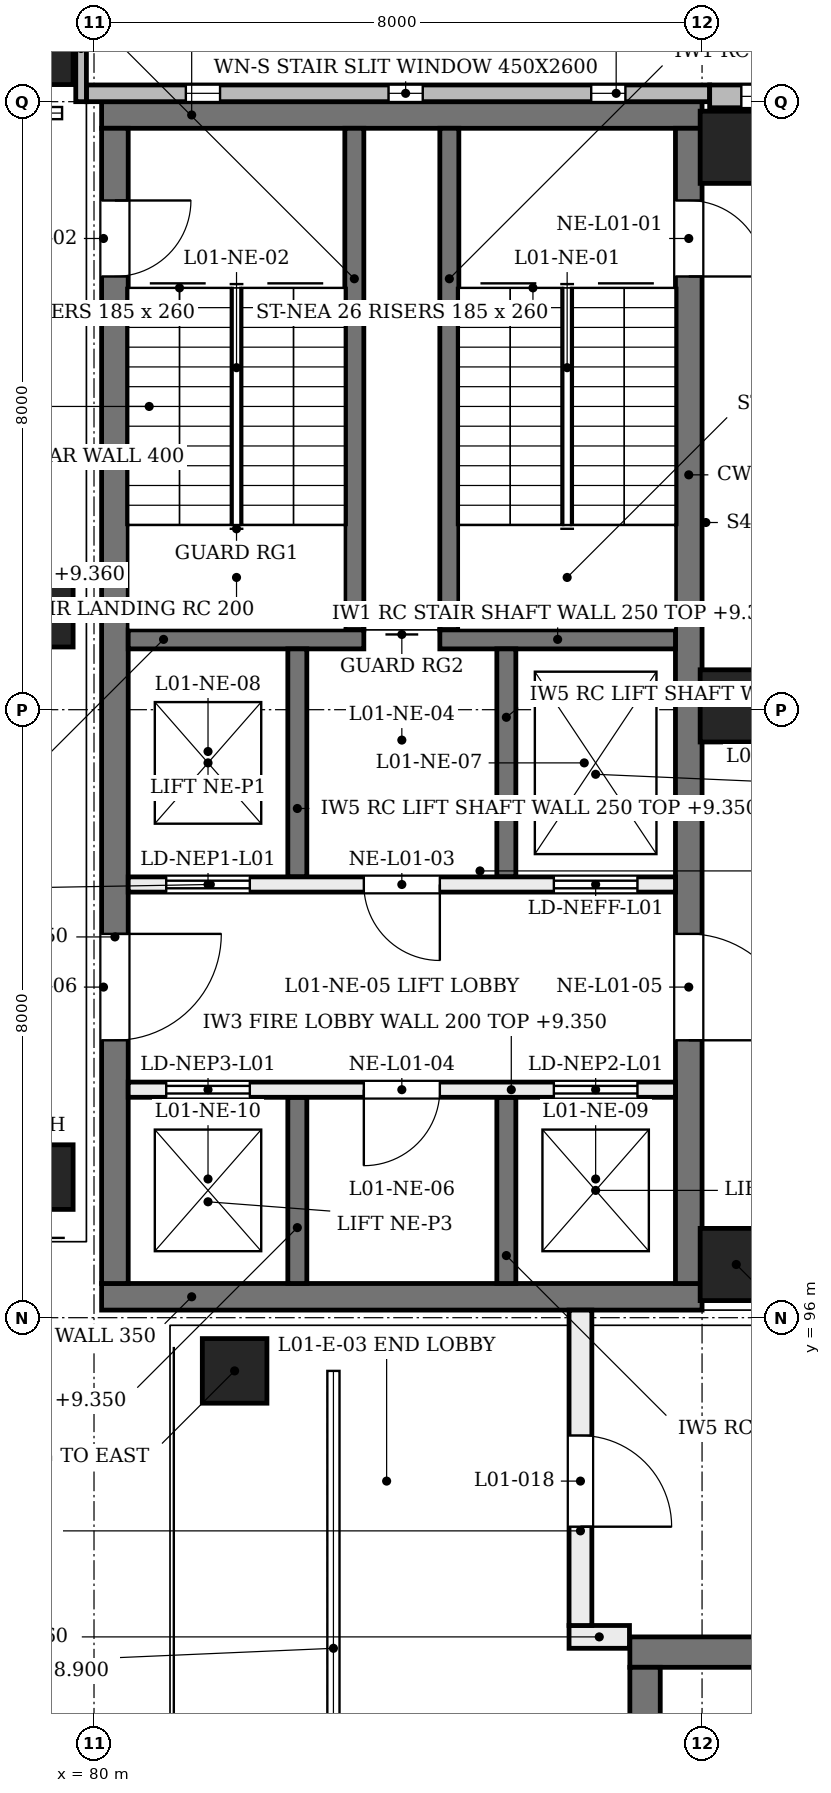
"""IFC4 building model, lengths in metres.
Left out: names, types, materials, properties, quantities, classifications, styles, units other than length and angle.
Written with IfcOpenShell. Run it as: python <this file> out.ifc"""

import sys

from ifc_helpers import new_model, si_unit, direction, frame, frame_2d, origin, origin_2d, place, context, subcontext, project, spatial, rectangle, extrude, element, fill, save


model = new_model("IFC4")
c1 = context("Model", 3, precision=1e-05, world=origin(), true_north=direction((0.0, 1.0)))
c2 = subcontext(c1, "Body", "Model", "MODEL_VIEW")
j1 = project(units=[si_unit("LENGTHUNIT", "METRE"), si_unit("PLANEANGLEUNIT", "RADIAN")], contexts=[c1])
p1 = place(None, origin())
s1 = spatial("IfcSite", under=j1, at=p1, CompositionType="ELEMENT")
p2 = place(p1, origin())
s2 = spatial("IfcBuilding", under=s1, at=p2, CompositionType="ELEMENT")
p3 = place(p2, frame((0.0, 0.0, 4.8)))
s3 = spatial("IfcBuildingStorey", under=s2, at=p3, CompositionType="ELEMENT", Elevation=4.8)
p4 = place(p3, frame((87.05, 91.6, 0.0), z_axis=(0.0, 0.0, 1.0), x_axis=(1.0, 0.0, 0.0)))
e1 = element("IfcWall", 1, at=p4, inside=s3, PredefinedType="SHEAR", context=c2, shape_type="SweptSolid", body=[
    extrude(rectangle(XDim=8.55, YDim=0.4, at=frame_2d((4.275, 0.0))), origin(), (0.0, 0.0, 1.0), 4.58),
])
p5 = place(p3, frame((87.25, 75.8, 0.0), z_axis=(0.0, 0.0, 1.0), x_axis=(0.0, 1.0, 0.0)))
e2 = element("IfcWall", 2, at=p5, inside=s3, PredefinedType="SHEAR", context=c2, shape_type="SweptSolid", body=[
    extrude(rectangle(XDim=15.6, YDim=0.4, at=frame_2d((7.8, 0.0))), origin(), (0.0, 0.0, 1.0), 4.58),
])
for number, where, z_axis, x_axis in (
    (3, (80.1, 96.275, 0.0), (0.0, 0.0, 1.0), (1.0, 0.0, 0.0)),
    (4, (80.1, 111.825, 0.0), (0.0, 0.0, 1.0), (1.0, 0.0, 0.0)),
):
    element("IfcWall", number, at=place(p3, frame(where, z_axis=z_axis, x_axis=x_axis)), inside=s3, PredefinedType="SHEAR", context=c2, shape_type="SweptSolid", body=[
        extrude(rectangle(XDim=7.9, YDim=0.35, at=frame_2d((3.95, 0.0))), origin(), (0.0, 0.0, 1.0), 4.58),
    ])
p6 = place(p3, frame((80.275, 96.45, 0.0), z_axis=(0.0, 0.0, 1.0), x_axis=(0.0, 1.0, 0.0)))
e5 = element("IfcWall", 5, at=p6, inside=s3, PredefinedType="SHEAR", context=c2, shape_type="SweptSolid", body=[
    extrude(rectangle(XDim=15.2, YDim=0.35, at=frame_2d((7.6, 0.0))), origin(), (0.0, 0.0, 1.0), 4.58),
])
p7 = place(p6, frame((13.25, 0.0, 0.0)))
e6 = element("IfcOpeningElement", 6, at=p7, cuts=e5, PredefinedType="OPENING", context=c2, shape_type="SweptSolid", body=[
    extrude(rectangle(XDim=1.0, YDim=2.1, at=frame_2d((0.5, 1.05))), frame((0.0, 0.185, 0.0), z_axis=(0.0, -1.0, 0.0), x_axis=(1.0, 0.0, 0.0)), (0.0, 0.0, 1.0), 0.37),
])
p8 = place(p6, frame((3.2, 0.0, 0.0)))
e7 = element("IfcOpeningElement", 7, at=p8, cuts=e5, PredefinedType="OPENING", context=c2, shape_type="SweptSolid", body=[
    extrude(rectangle(XDim=1.4, YDim=2.1, at=frame_2d((0.7, 1.05))), frame((0.0, 0.185, 0.0), z_axis=(0.0, -1.0, 0.0), x_axis=(1.0, 0.0, 0.0)), (0.0, 0.0, 1.0), 0.37),
])
p9 = place(p3, frame((87.825, 96.45, 0.0), z_axis=(0.0, 0.0, 1.0), x_axis=(0.0, 1.0, 0.0)))
e8 = element("IfcWall", 8, at=p9, inside=s3, PredefinedType="SHEAR", context=c2, shape_type="SweptSolid", body=[
    extrude(rectangle(XDim=15.2, YDim=0.35, at=frame_2d((7.6, 0.0))), origin(), (0.0, 0.0, 1.0), 4.58),
])
p10 = place(p9, frame((13.25, 0.0, 0.0)))
e9 = element("IfcOpeningElement", 9, at=p10, cuts=e8, PredefinedType="OPENING", context=c2, shape_type="SweptSolid", body=[
    extrude(rectangle(XDim=1.0, YDim=2.1, at=frame_2d((0.5, 1.05))), frame((0.0, 0.185, 0.0), z_axis=(0.0, -1.0, 0.0), x_axis=(1.0, 0.0, 0.0)), (0.0, 0.0, 1.0), 0.37),
])
p11 = place(p9, frame((3.2, 0.0, 0.0)))
e10 = element("IfcOpeningElement", 10, at=p11, cuts=e8, PredefinedType="OPENING", context=c2, shape_type="SweptSolid", body=[
    extrude(rectangle(XDim=1.4, YDim=2.1, at=frame_2d((0.7, 1.05))), frame((0.0, 0.185, 0.0), z_axis=(0.0, -1.0, 0.0), x_axis=(1.0, 0.0, 0.0)), (0.0, 0.0, 1.0), 0.37),
])
for number, where, z_axis, x_axis in (
    (11, (88.45, 96.7, 0.0), (0.0, 0.0, 1.0), (1.0, 0.0, 0.0)),
    (12, (88.45, 104.05, 0.0), (0.0, 0.0, 1.0), (1.0, 0.0, 0.0)),
    (13, (88.45, 111.4, 0.0), (0.0, 0.0, 1.0), (1.0, 0.0, 0.0)),
):
    element("IfcColumn", number, at=place(p3, frame(where, z_axis=z_axis, x_axis=x_axis)), inside=s3, PredefinedType="COLUMN", context=c2, shape_type="SweptSolid", body=[
        extrude(rectangle(XDim=0.95, YDim=0.95, at=origin_2d()), origin(), (0.0, 0.0, 1.0), 4.8),
    ])
for number, where, z_axis, x_axis in (
    (14, (79.3, 97.6, 0.0), (0.0, 0.204, 0.979), (-1.0, 0.0, 0.0)),
    (15, (79.3, 105.0, 0.0), (0.0, 0.204, 0.979), (-1.0, 0.0, 0.0)),
    (16, (79.3, 112.4, 0.0), (0.0, 0.204, 0.979), (-1.0, 0.0, 0.0)),
    (17, (81.6, 95.3, 0.0), (0.204, 0.0, 0.979), (0.0, 1.0, 0.0)),
    (18, (89.0, 95.3, 0.0), (0.204, 0.0, 0.979), (0.0, 1.0, 0.0)),
):
    element("IfcColumn", number, at=place(p3, frame(where, z_axis=z_axis, x_axis=x_axis)), inside=s3, PredefinedType="COLUMN", context=c2, shape_type="SweptSolid", body=[
        extrude(rectangle(XDim=0.85, YDim=0.85, at=origin_2d()), origin(), (0.0, 0.0, 1.0), 4.903),
    ])
p12 = place(p3, frame((83.15, 88.2, 4.1), z_axis=(0.0, 0.0, 1.0), x_axis=(0.0, 1.0, 0.0)))
e19 = element("IfcWall", 19, at=p12, inside=s3, PredefinedType="SOLIDWALL", context=c2, shape_type="SweptSolid", body=[
    extrude(rectangle(XDim=6.9, YDim=0.15, at=frame_2d((3.45, 0.0))), origin(), (0.0, 0.0, 1.0), 0.48),
])
p13 = place(p3, frame((79.9, 112.11, 0.0), z_axis=(0.0, 0.0, 1.0), x_axis=(1.0, 0.0, 0.0)))
e20 = element("IfcWall", 20, at=p13, inside=s3, PredefinedType="SOLIDWALL", context=c2, shape_type="SweptSolid", body=[
    extrude(rectangle(XDim=8.2, YDim=0.22, at=frame_2d((4.1, 0.0))), origin(), (0.0, 0.0, 1.0), 3.9),
])
p14 = place(p13, frame((1.308, 0.0, 0.9)))
e21 = element("IfcOpeningElement", 21, at=p14, cuts=e20, PredefinedType="OPENING", context=c2, shape_type="SweptSolid", body=[
    extrude(rectangle(XDim=0.45, YDim=2.6, at=frame_2d((0.225, 1.3))), frame((0.0, 0.12, 0.0), z_axis=(0.0, -1.0, 0.0), x_axis=(1.0, 0.0, 0.0)), (0.0, 0.0, 1.0), 0.24),
])
p15 = place(p13, frame((3.975, 0.0, 0.9)))
e22 = element("IfcOpeningElement", 22, at=p15, cuts=e20, PredefinedType="OPENING", context=c2, shape_type="SweptSolid", body=[
    extrude(rectangle(XDim=0.45, YDim=2.6, at=frame_2d((0.225, 1.3))), frame((0.0, 0.12, 0.0), z_axis=(0.0, -1.0, 0.0), x_axis=(1.0, 0.0, 0.0)), (0.0, 0.0, 1.0), 0.24),
])
p16 = place(p13, frame((6.642, 0.0, 0.9)))
e23 = element("IfcOpeningElement", 23, at=p16, cuts=e20, PredefinedType="OPENING", context=c2, shape_type="SweptSolid", body=[
    extrude(rectangle(XDim=0.45, YDim=2.6, at=frame_2d((0.225, 1.3))), frame((0.0, 0.12, 0.0), z_axis=(0.0, -1.0, 0.0), x_axis=(1.0, 0.0, 0.0)), (0.0, 0.0, 1.0), 0.24),
])
p17 = place(p3, frame((88.1, 112.07, 0.0), z_axis=(0.0, 0.0, 1.0), x_axis=(1.0, 0.0, 0.0)))
e24 = element("IfcWall", 24, at=p17, inside=s3, PredefinedType="SOLIDWALL", context=c2, shape_type="SweptSolid", body=[
    extrude(rectangle(XDim=7.9, YDim=0.3, at=frame_2d((3.95, 0.0))), origin(), (0.0, 0.0, 1.0), 3.9),
])
p18 = place(p17, frame((0.417, 0.0, 0.75)))
e25 = element("IfcOpeningElement", 25, at=p18, cuts=e24, PredefinedType="OPENING", context=c2, shape_type="SweptSolid", body=[
    extrude(rectangle(XDim=1.8, YDim=3.1, at=frame_2d((0.9, 1.55))), frame((0.0, 0.16, 0.0), z_axis=(0.0, -1.0, 0.0), x_axis=(1.0, 0.0, 0.0)), (0.0, 0.0, 1.0), 0.32),
])
p19 = place(p17, frame((3.05, 0.0, 0.75)))
e26 = element("IfcOpeningElement", 26, at=p19, cuts=e24, PredefinedType="OPENING", context=c2, shape_type="SweptSolid", body=[
    extrude(rectangle(XDim=1.8, YDim=3.1, at=frame_2d((0.9, 1.55))), frame((0.0, 0.16, 0.0), z_axis=(0.0, -1.0, 0.0), x_axis=(1.0, 0.0, 0.0)), (0.0, 0.0, 1.0), 0.32),
])
p20 = place(p17, frame((5.683, 0.0, 0.75)))
e27 = element("IfcOpeningElement", 27, at=p20, cuts=e24, PredefinedType="OPENING", context=c2, shape_type="SweptSolid", body=[
    extrude(rectangle(XDim=1.8, YDim=3.1, at=frame_2d((0.9, 1.55))), frame((0.0, 0.16, 0.0), z_axis=(0.0, -1.0, 0.0), x_axis=(1.0, 0.0, 0.0)), (0.0, 0.0, 1.0), 0.32),
])
p21 = place(p3, frame((79.83, 112.0, 0.0), z_axis=(0.0, 0.0, 1.0), x_axis=(0.0, 1.0, 0.0)))
e28 = element("IfcWall", 28, at=p21, inside=s3, PredefinedType="SOLIDWALL", context=c2, shape_type="SweptSolid", body=[
    extrude(rectangle(XDim=1.0, YDim=0.14, at=frame_2d((0.5, 0.0))), origin(), (0.0, 0.0, 1.0), 3.9),
])
for number, where, z_axis, x_axis in (
    (29, (84.675, 111.65, 0.0), (0.0, 0.0, 1.0), (0.0, -1.0, 0.0)),
    (30, (83.425, 111.65, 0.0), (0.0, 0.0, 1.0), (0.0, -1.0, 0.0)),
):
    element("IfcWall", number, at=place(p3, frame(where, z_axis=z_axis, x_axis=x_axis)), inside=s3, PredefinedType="SOLIDWALL", context=c2, shape_type="SweptSolid", body=[
        extrude(rectangle(XDim=6.6, YDim=0.25, at=frame_2d((3.3, 0.0))), origin(), (0.0, 0.0, 1.0), 4.55),
    ])
p22 = place(p3, frame((87.65, 104.925, 0.0), z_axis=(0.0, 0.0, 1.0), x_axis=(-1.0, 0.0, 0.0)))
e31 = element("IfcWall", 31, at=p22, inside=s3, PredefinedType="SOLIDWALL", context=c2, shape_type="SweptSolid", body=[
    extrude(rectangle(XDim=3.1, YDim=0.25, at=frame_2d((1.55, 0.0))), origin(), (0.0, 0.0, 1.0), 4.55),
])
p23 = place(p3, frame((83.55, 104.925, 0.0), z_axis=(0.0, 0.0, 1.0), x_axis=(-1.0, 0.0, 0.0)))
e32 = element("IfcWall", 32, at=p23, inside=s3, PredefinedType="SOLIDWALL", context=c2, shape_type="SweptSolid", body=[
    extrude(rectangle(XDim=3.1, YDim=0.25, at=frame_2d((1.55, 0.0))), origin(), (0.0, 0.0, 1.0), 4.55),
])
p24 = place(p3, frame((85.425, 104.8, 0.0), z_axis=(0.0, 0.0, 1.0), x_axis=(0.0, -1.0, 0.0)))
e33 = element("IfcWall", 33, at=p24, inside=s3, PredefinedType="SOLIDWALL", context=c2, shape_type="SweptSolid", body=[
    extrude(rectangle(XDim=3.0, YDim=0.25, at=frame_2d((1.5, 0.0))), origin(), (0.0, 0.0, 1.0), 4.55),
])
p25 = place(p3, frame((85.425, 98.9, 0.0), z_axis=(0.0, 0.0, 1.0), x_axis=(0.0, -1.0, 0.0)))
e34 = element("IfcWall", 34, at=p25, inside=s3, PredefinedType="SOLIDWALL", context=c2, shape_type="SweptSolid", body=[
    extrude(rectangle(XDim=2.45, YDim=0.25, at=frame_2d((1.225, 0.0))), origin(), (0.0, 0.0, 1.0), 4.55),
])
p26 = place(p3, frame((82.675, 104.8, 0.0), z_axis=(0.0, 0.0, 1.0), x_axis=(0.0, -1.0, 0.0)))
e35 = element("IfcWall", 35, at=p26, inside=s3, PredefinedType="SOLIDWALL", context=c2, shape_type="SweptSolid", body=[
    extrude(rectangle(XDim=3.0, YDim=0.25, at=frame_2d((1.5, 0.0))), origin(), (0.0, 0.0, 1.0), 4.55),
])
p27 = place(p3, frame((82.675, 98.9, 0.0), z_axis=(0.0, 0.0, 1.0), x_axis=(0.0, -1.0, 0.0)))
e36 = element("IfcWall", 36, at=p27, inside=s3, PredefinedType="SOLIDWALL", context=c2, shape_type="SweptSolid", body=[
    extrude(rectangle(XDim=2.45, YDim=0.25, at=frame_2d((1.225, 0.0))), origin(), (0.0, 0.0, 1.0), 4.55),
])
p28 = place(p3, frame((87.65, 101.7, 0.0), z_axis=(0.0, 0.0, 1.0), x_axis=(-1.0, 0.0, 0.0)))
e37 = element("IfcWall", 37, at=p28, inside=s3, PredefinedType="SOLIDWALL", context=c2, shape_type="SweptSolid", body=[
    extrude(rectangle(XDim=7.2, YDim=0.2, at=frame_2d((3.6, 0.0))), origin(), (0.0, 0.0, 1.0), 4.55),
])
p29 = place(p28, frame((0.5, 0.0, 0.0)))
e38 = element("IfcOpeningElement", 38, at=p29, cuts=e37, PredefinedType="OPENING", context=c2, shape_type="SweptSolid", body=[
    extrude(rectangle(XDim=1.1, YDim=2.1, at=frame_2d((0.55, 1.05))), frame((0.0, 0.11, 0.0), z_axis=(0.0, -1.0, 0.0), x_axis=(1.0, 0.0, 0.0)), (0.0, 0.0, 1.0), 0.22),
])
p30 = place(p28, frame((5.6, 0.0, 0.0)))
e39 = element("IfcOpeningElement", 39, at=p30, cuts=e37, PredefinedType="OPENING", context=c2, shape_type="SweptSolid", body=[
    extrude(rectangle(XDim=1.1, YDim=2.1, at=frame_2d((0.55, 1.05))), frame((0.0, 0.11, 0.0), z_axis=(0.0, -1.0, 0.0), x_axis=(1.0, 0.0, 0.0)), (0.0, 0.0, 1.0), 0.22),
])
p31 = place(p28, frame((3.1, 0.0, 0.0)))
e40 = element("IfcOpeningElement", 40, at=p31, cuts=e37, PredefinedType="OPENING", context=c2, shape_type="SweptSolid", body=[
    extrude(rectangle(XDim=1.0, YDim=2.1, at=frame_2d((0.5, 1.05))), frame((0.0, 0.11, 0.0), z_axis=(0.0, -1.0, 0.0), x_axis=(1.0, 0.0, 0.0)), (0.0, 0.0, 1.0), 0.22),
])
p32 = place(p3, frame((87.65, 99.0, 0.0), z_axis=(0.0, 0.0, 1.0), x_axis=(-1.0, 0.0, 0.0)))
e41 = element("IfcWall", 41, at=p32, inside=s3, PredefinedType="SOLIDWALL", context=c2, shape_type="SweptSolid", body=[
    extrude(rectangle(XDim=7.2, YDim=0.2, at=frame_2d((3.6, 0.0))), origin(), (0.0, 0.0, 1.0), 4.55),
])
p33 = place(p32, frame((0.5, 0.0, 0.0)))
e42 = element("IfcOpeningElement", 42, at=p33, cuts=e41, PredefinedType="OPENING", context=c2, shape_type="SweptSolid", body=[
    extrude(rectangle(XDim=1.1, YDim=2.1, at=frame_2d((0.55, 1.05))), frame((0.0, 0.11, 0.0), z_axis=(0.0, -1.0, 0.0), x_axis=(1.0, 0.0, 0.0)), (0.0, 0.0, 1.0), 0.22),
])
p34 = place(p32, frame((5.6, 0.0, 0.0)))
e43 = element("IfcOpeningElement", 43, at=p34, cuts=e41, PredefinedType="OPENING", context=c2, shape_type="SweptSolid", body=[
    extrude(rectangle(XDim=1.1, YDim=2.1, at=frame_2d((0.55, 1.05))), frame((0.0, 0.11, 0.0), z_axis=(0.0, -1.0, 0.0), x_axis=(1.0, 0.0, 0.0)), (0.0, 0.0, 1.0), 0.22),
])
p35 = place(p32, frame((3.1, 0.0, 0.0)))
e44 = element("IfcOpeningElement", 44, at=p35, cuts=e41, PredefinedType="OPENING", context=c2, shape_type="SweptSolid", body=[
    extrude(rectangle(XDim=1.0, YDim=2.1, at=frame_2d((0.5, 1.05))), frame((0.0, 0.11, 0.0), z_axis=(0.0, -1.0, 0.0), x_axis=(1.0, 0.0, 0.0)), (0.0, 0.0, 1.0), 0.22),
])
p36 = place(p3, frame((86.25, 91.8, 0.0), z_axis=(0.0, 0.0, 1.0), x_axis=(1.0, 0.0, 0.0)))
e45 = element("IfcWall", 45, at=p36, inside=s3, PredefinedType="PARTITIONING", context=c2, shape_type="SweptSolid", body=[
    extrude(rectangle(XDim=0.795, YDim=0.3, at=frame_2d((0.397, 0.0))), origin(), (0.0, 0.0, 1.0), 4.56),
])
p37 = place(p3, frame((86.4, 91.95, 0.0), z_axis=(0.0, 0.0, 1.0), x_axis=(0.0, 1.0, 0.0)))
e46 = element("IfcWall", 46, at=p37, inside=s3, PredefinedType="PARTITIONING", context=c2, shape_type="SweptSolid", body=[
    extrude(rectangle(XDim=4.15, YDim=0.3, at=frame_2d((2.075, 0.0))), origin(), (0.0, 0.0, 1.0), 3.88),
])
p38 = place(p37, frame((1.3, 0.0, 0.0)))
e47 = element("IfcOpeningElement", 47, at=p38, cuts=e46, PredefinedType="OPENING", context=c2, shape_type="SweptSolid", body=[
    extrude(rectangle(XDim=1.2, YDim=2.2, at=frame_2d((0.6, 1.1))), frame((0.0, 0.16, 0.0), z_axis=(0.0, -1.0, 0.0), x_axis=(1.0, 0.0, 0.0)), (0.0, 0.0, 1.0), 0.32),
])
p39 = place(p14, origin())
e48 = element("IfcWindow", 48, at=p39, inside=s3, PartitioningType="SINGLE_PANEL", PredefinedType="WINDOW", context=c2, shape_type="SweptSolid", body=[
    extrude(rectangle(XDim=0.45, YDim=2.6, at=frame_2d((0.225, 1.3))), frame((0.0, 0.03, 0.0), z_axis=(0.0, -1.0, 0.0), x_axis=(1.0, 0.0, 0.0)), (0.0, 0.0, 1.0), 0.06),
])
fill(e21, e48)
p40 = place(p15, origin())
e49 = element("IfcWindow", 49, at=p40, inside=s3, PartitioningType="SINGLE_PANEL", PredefinedType="WINDOW", context=c2, shape_type="SweptSolid", body=[
    extrude(rectangle(XDim=0.45, YDim=2.6, at=frame_2d((0.225, 1.3))), frame((0.0, 0.03, 0.0), z_axis=(0.0, -1.0, 0.0), x_axis=(1.0, 0.0, 0.0)), (0.0, 0.0, 1.0), 0.06),
])
fill(e22, e49)
p41 = place(p16, origin())
e50 = element("IfcWindow", 50, at=p41, inside=s3, PartitioningType="SINGLE_PANEL", PredefinedType="WINDOW", context=c2, shape_type="SweptSolid", body=[
    extrude(rectangle(XDim=0.45, YDim=2.6, at=frame_2d((0.225, 1.3))), frame((0.0, 0.03, 0.0), z_axis=(0.0, -1.0, 0.0), x_axis=(1.0, 0.0, 0.0)), (0.0, 0.0, 1.0), 0.06),
])
fill(e23, e50)
p42 = place(p18, origin())
e51 = element("IfcWindow", 51, at=p42, inside=s3, PartitioningType="SINGLE_PANEL", PredefinedType="WINDOW", context=c2, shape_type="SweptSolid", body=[
    extrude(rectangle(XDim=1.8, YDim=3.1, at=frame_2d((0.9, 1.55))), frame((0.0, 0.03, 0.0), z_axis=(0.0, -1.0, 0.0), x_axis=(1.0, 0.0, 0.0)), (0.0, 0.0, 1.0), 0.06),
])
fill(e25, e51)
p43 = place(p10, frame((1.0, 0.0, 0.0), z_axis=(0.0, 0.0, 1.0), x_axis=(-1.0, 0.0, 0.0)))
e52 = element("IfcDoor", 52, at=p43, inside=s3, OperationType="SINGLE_SWING_LEFT", PredefinedType="DOOR", context=c2, shape_type="SweptSolid", body=[
    extrude(rectangle(XDim=1.0, YDim=2.1, at=frame_2d((0.5, 1.05))), frame((0.0, 0.025, 0.0), z_axis=(0.0, -1.0, 0.0), x_axis=(1.0, 0.0, 0.0)), (0.0, 0.0, 1.0), 0.05),
])
fill(e9, e52)
p44 = place(p7, origin())
e53 = element("IfcDoor", 53, at=p44, inside=s3, OperationType="SINGLE_SWING_RIGHT", PredefinedType="DOOR", context=c2, shape_type="SweptSolid", body=[
    extrude(rectangle(XDim=1.0, YDim=2.1, at=frame_2d((0.5, 1.05))), frame((0.0, 0.025, 0.0), z_axis=(0.0, -1.0, 0.0), x_axis=(1.0, 0.0, 0.0)), (0.0, 0.0, 1.0), 0.05),
])
fill(e6, e53)
p45 = place(p29, origin())
e54 = element("IfcDoor", 54, at=p45, inside=s3, OperationType="DOUBLE_DOOR_SLIDING", PredefinedType="DOOR", context=c2, shape_type="SweptSolid", body=[
    extrude(rectangle(XDim=1.1, YDim=2.1, at=frame_2d((0.55, 1.05))), frame((0.0, 0.025, 0.0), z_axis=(0.0, -1.0, 0.0), x_axis=(1.0, 0.0, 0.0)), (0.0, 0.0, 1.0), 0.05),
])
fill(e38, e54)
p46 = place(p30, origin())
e55 = element("IfcDoor", 55, at=p46, inside=s3, OperationType="DOUBLE_DOOR_SLIDING", PredefinedType="DOOR", context=c2, shape_type="SweptSolid", body=[
    extrude(rectangle(XDim=1.1, YDim=2.1, at=frame_2d((0.55, 1.05))), frame((0.0, 0.025, 0.0), z_axis=(0.0, -1.0, 0.0), x_axis=(1.0, 0.0, 0.0)), (0.0, 0.0, 1.0), 0.05),
])
fill(e39, e55)
p47 = place(p33, frame((1.1, 0.0, 0.0), z_axis=(0.0, 0.0, 1.0), x_axis=(-1.0, 0.0, 0.0)))
e56 = element("IfcDoor", 56, at=p47, inside=s3, OperationType="DOUBLE_DOOR_SLIDING", PredefinedType="DOOR", context=c2, shape_type="SweptSolid", body=[
    extrude(rectangle(XDim=1.1, YDim=2.1, at=frame_2d((0.55, 1.05))), frame((0.0, 0.025, 0.0), z_axis=(0.0, -1.0, 0.0), x_axis=(1.0, 0.0, 0.0)), (0.0, 0.0, 1.0), 0.05),
])
fill(e42, e56)
p48 = place(p34, frame((1.1, 0.0, 0.0), z_axis=(0.0, 0.0, 1.0), x_axis=(-1.0, 0.0, 0.0)))
e57 = element("IfcDoor", 57, at=p48, inside=s3, OperationType="DOUBLE_DOOR_SLIDING", PredefinedType="DOOR", context=c2, shape_type="SweptSolid", body=[
    extrude(rectangle(XDim=1.1, YDim=2.1, at=frame_2d((0.55, 1.05))), frame((0.0, 0.025, 0.0), z_axis=(0.0, -1.0, 0.0), x_axis=(1.0, 0.0, 0.0)), (0.0, 0.0, 1.0), 0.05),
])
fill(e43, e57)
p49 = place(p31, origin())
e58 = element("IfcDoor", 58, at=p49, inside=s3, OperationType="SINGLE_SWING_LEFT", PredefinedType="DOOR", context=c2, shape_type="SweptSolid", body=[
    extrude(rectangle(XDim=1.0, YDim=2.1, at=frame_2d((0.5, 1.05))), frame((0.0, 0.025, 0.0), z_axis=(0.0, -1.0, 0.0), x_axis=(1.0, 0.0, 0.0)), (0.0, 0.0, 1.0), 0.05),
])
fill(e40, e58)
p50 = place(p35, frame((1.0, 0.0, 0.0), z_axis=(0.0, 0.0, 1.0), x_axis=(-1.0, 0.0, 0.0)))
e59 = element("IfcDoor", 59, at=p50, inside=s3, OperationType="SINGLE_SWING_RIGHT", PredefinedType="DOOR", context=c2, shape_type="SweptSolid", body=[
    extrude(rectangle(XDim=1.0, YDim=2.1, at=frame_2d((0.5, 1.05))), frame((0.0, 0.025, 0.0), z_axis=(0.0, -1.0, 0.0), x_axis=(1.0, 0.0, 0.0)), (0.0, 0.0, 1.0), 0.05),
])
fill(e44, e59)
p51 = place(p11, frame((1.4, 0.0, 0.0), z_axis=(0.0, 0.0, 1.0), x_axis=(-1.0, 0.0, 0.0)))
e60 = element("IfcDoor", 60, at=p51, inside=s3, OperationType="SINGLE_SWING_LEFT", PredefinedType="DOOR", context=c2, shape_type="SweptSolid", body=[
    extrude(rectangle(XDim=1.4, YDim=2.1, at=frame_2d((0.7, 1.05))), frame((0.0, 0.025, 0.0), z_axis=(0.0, -1.0, 0.0), x_axis=(1.0, 0.0, 0.0)), (0.0, 0.0, 1.0), 0.05),
])
fill(e10, e60)
p52 = place(p8, origin())
e61 = element("IfcDoor", 61, at=p52, inside=s3, OperationType="SINGLE_SWING_RIGHT", PredefinedType="DOOR", context=c2, shape_type="SweptSolid", body=[
    extrude(rectangle(XDim=1.4, YDim=2.1, at=frame_2d((0.7, 1.05))), frame((0.0, 0.025, 0.0), z_axis=(0.0, -1.0, 0.0), x_axis=(1.0, 0.0, 0.0)), (0.0, 0.0, 1.0), 0.05),
])
fill(e7, e61)
p53 = place(p38, frame((1.2, 0.0, 0.0), z_axis=(0.0, 0.0, 1.0), x_axis=(-1.0, 0.0, 0.0)))
e62 = element("IfcDoor", 62, at=p53, inside=s3, OperationType="SINGLE_SWING_LEFT", PredefinedType="DOOR", context=c2, shape_type="SweptSolid", body=[
    extrude(rectangle(XDim=1.2, YDim=2.2, at=frame_2d((0.6, 1.1))), frame((0.0, 0.025, 0.0), z_axis=(0.0, -1.0, 0.0), x_axis=(1.0, 0.0, 0.0)), (0.0, 0.0, 1.0), 0.05),
])
fill(e47, e62)
save(model, sys.argv[1])
